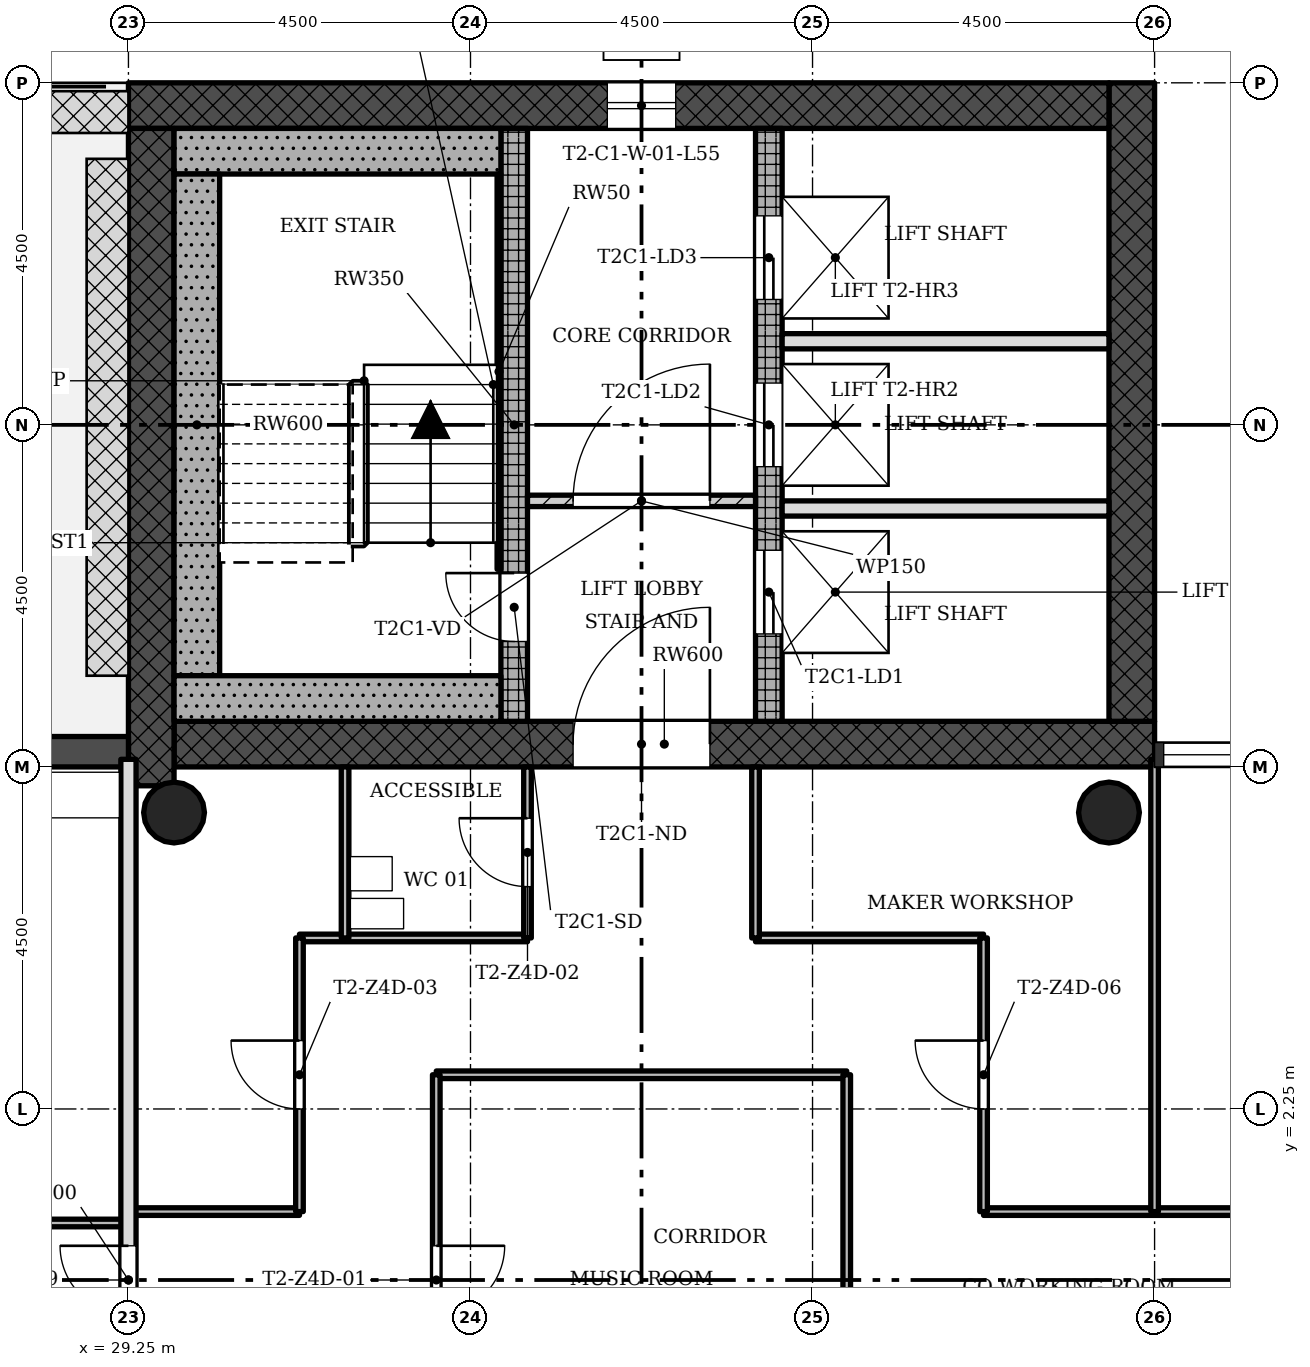
"""IFC4 building model, lengths in metres.
Left out: names, types, materials, properties, quantities, classifications, styles, units other than length and angle.
Written with IfcOpenShell. Run it as: python <this file> out.ifc"""

import sys

from ifc_helpers import new_model, si_unit, direction, frame, frame_2d, origin, origin_2d, place, context, subcontext, project, spatial, rectangle, hollow_circle, extrude, element, fill, save


model = new_model("IFC4")
c1 = context("Model", 3, precision=1e-05, world=origin(), true_north=direction((0.0, 1.0)))
c2 = subcontext(c1, "Body", "Model", "MODEL_VIEW")
j1 = project(units=[si_unit("LENGTHUNIT", "METRE"), si_unit("PLANEANGLEUNIT", "RADIAN")], contexts=[c1])
p1 = place(None, origin())
s1 = spatial("IfcSite", under=j1, at=p1, CompositionType="ELEMENT")
p2 = place(p1, origin())
s2 = spatial("IfcBuilding", under=s1, at=p2, CompositionType="ELEMENT")
p3 = place(p2, frame((0.0, 0.0, 199.4)))
s3 = spatial("IfcBuildingStorey", under=s2, at=p3, CompositionType="ELEMENT", Elevation=199.4)
p4 = place(p3, frame((29.85, 7.05, 0.0), z_axis=(0.0, 0.0, 1.0), x_axis=(1.0, 0.0, 0.0)))
e1 = element("IfcWall", 1, at=p4, inside=s3, PredefinedType="SHEAR", context=c2, shape_type="SweptSolid", body=[
    extrude(rectangle(XDim=12.9, YDim=0.6, at=frame_2d((6.45, 0.0))), origin(), (0.0, 0.0, 1.0), 3.4),
])
p5 = place(p4, frame((5.25, 0.0, 0.0)))
e2 = element("IfcOpeningElement", 2, at=p5, cuts=e1, PredefinedType="OPENING", context=c2, shape_type="SweptSolid", body=[
    extrude(rectangle(XDim=1.8, YDim=2.1, at=frame_2d((0.9, 1.05))), frame((0.0, 0.31, 0.0), z_axis=(0.0, -1.0, 0.0), x_axis=(1.0, 0.0, 0.0)), (0.0, 0.0, 1.0), 0.62),
])
p6 = place(p3, frame((42.45, 7.35, 0.0), z_axis=(0.0, 0.0, 1.0), x_axis=(0.0, 1.0, 0.0)))
e3 = element("IfcWall", 3, at=p6, inside=s3, PredefinedType="SHEAR", context=c2, shape_type="SweptSolid", body=[
    extrude(rectangle(XDim=8.4, YDim=0.6, at=frame_2d((4.2, 0.0))), origin(), (0.0, 0.0, 1.0), 3.4),
])
p7 = place(p3, frame((42.15, 15.45, 0.0), z_axis=(0.0, 0.0, 1.0), x_axis=(-1.0, 0.0, 0.0)))
e4 = element("IfcWall", 4, at=p7, inside=s3, PredefinedType="SHEAR", context=c2, shape_type="SweptSolid", body=[
    extrude(rectangle(XDim=12.9, YDim=0.6, at=frame_2d((6.45, 0.0))), origin(), (0.0, 0.0, 1.0), 3.4),
])
p8 = place(p7, frame((5.7, 0.0, 0.45)))
e5 = element("IfcOpeningElement", 5, at=p8, cuts=e4, PredefinedType="OPENING", context=c2, shape_type="SweptSolid", body=[
    extrude(rectangle(XDim=0.9, YDim=2.4, at=frame_2d((0.45, 1.2))), frame((0.0, 0.31, 0.0), z_axis=(0.0, -1.0, 0.0), x_axis=(1.0, 0.0, 0.0)), (0.0, 0.0, 1.0), 0.62),
])
p9 = place(p3, frame((29.55, 15.15, 0.0), z_axis=(0.0, 0.0, 1.0), x_axis=(0.0, -1.0, 0.0)))
e6 = element("IfcWall", 6, at=p9, inside=s3, PredefinedType="SHEAR", context=c2, shape_type="SweptSolid", body=[
    extrude(rectangle(XDim=8.648, YDim=0.6, at=frame_2d((4.324, 0.0))), origin(), (0.0, 0.0, 1.0), 3.4),
])
p10 = place(p3, frame((34.325, 7.35, 0.0), z_axis=(0.0, 0.0, 1.0), x_axis=(0.0, 1.0, 0.0)))
e7 = element("IfcWall", 7, at=p10, inside=s3, PredefinedType="SHEAR", context=c2, shape_type="SweptSolid", body=[
    extrude(rectangle(XDim=7.8, YDim=0.35, at=frame_2d((3.9, 0.0))), origin(), (0.0, 0.0, 1.0), 3.4),
])
p11 = place(p10, frame((1.05, 0.0, 0.0)))
e8 = element("IfcOpeningElement", 8, at=p11, cuts=e7, PredefinedType="OPENING", context=c2, shape_type="SweptSolid", body=[
    extrude(rectangle(XDim=0.9, YDim=2.1, at=frame_2d((0.45, 1.05))), frame((0.0, 0.185, 0.0), z_axis=(0.0, -1.0, 0.0), x_axis=(1.0, 0.0, 0.0)), (0.0, 0.0, 1.0), 0.37),
])
p12 = place(p3, frame((37.675, 7.35, 0.0), z_axis=(0.0, 0.0, 1.0), x_axis=(0.0, 1.0, 0.0)))
e9 = element("IfcWall", 9, at=p12, inside=s3, PredefinedType="SHEAR", context=c2, shape_type="SweptSolid", body=[
    extrude(rectangle(XDim=7.8, YDim=0.35, at=frame_2d((3.9, 0.0))), origin(), (0.0, 0.0, 1.0), 3.4),
])
p13 = place(p12, frame((1.15, 0.0, 0.0)))
e10 = element("IfcOpeningElement", 10, at=p13, cuts=e9, PredefinedType="OPENING", context=c2, shape_type="SweptSolid", body=[
    extrude(rectangle(XDim=1.1, YDim=2.1, at=frame_2d((0.55, 1.05))), frame((0.0, 0.185, 0.0), z_axis=(0.0, -1.0, 0.0), x_axis=(1.0, 0.0, 0.0)), (0.0, 0.0, 1.0), 0.37),
])
p14 = place(p12, frame((3.35, 0.0, 0.0)))
e11 = element("IfcOpeningElement", 11, at=p14, cuts=e9, PredefinedType="OPENING", context=c2, shape_type="SweptSolid", body=[
    extrude(rectangle(XDim=1.1, YDim=2.1, at=frame_2d((0.55, 1.05))), frame((0.0, 0.185, 0.0), z_axis=(0.0, -1.0, 0.0), x_axis=(1.0, 0.0, 0.0)), (0.0, 0.0, 1.0), 0.37),
])
p15 = place(p12, frame((5.55, 0.0, 0.0)))
e12 = element("IfcOpeningElement", 12, at=p15, cuts=e9, PredefinedType="OPENING", context=c2, shape_type="SweptSolid", body=[
    extrude(rectangle(XDim=1.1, YDim=2.1, at=frame_2d((0.55, 1.05))), frame((0.0, 0.185, 0.0), z_axis=(0.0, -1.0, 0.0), x_axis=(1.0, 0.0, 0.0)), (0.0, 0.0, 1.0), 0.37),
])
for number, where, z_axis, x_axis in (
    (13, (42.15, 6.15, 0.0), (0.0, 0.0, 1.0), (1.0, 0.0, 0.0)),
    (14, (29.85, 6.15, 0.0), (0.0, 0.0, 1.0), (1.0, 0.0, 0.0)),
):
    element("IfcColumn", number, at=place(p3, frame(where, z_axis=z_axis, x_axis=x_axis)), inside=s3, PredefinedType="COLUMN", context=c2, shape_type="SweptSolid", body=[
        extrude(hollow_circle(Radius=0.4, WallThickness=0.028, at=origin_2d()), origin(), (0.0, 0.0, 1.0), 3.4),
    ])
p16 = place(p3, frame((29.25, 6.95, -0.02), z_axis=(0.0, 0.0, 1.0), x_axis=(-1.0, 0.0, 0.0)))
e15 = element("IfcWall", 15, at=p16, inside=s3, PredefinedType="STANDARD", context=c2, shape_type="SweptSolid", body=[
    extrude(rectangle(XDim=4.5, YDim=0.4, at=frame_2d((2.25, 0.0))), origin(), (0.0, 0.0, 1.0), 3.12),
])
p17 = place(p16, frame((1.35, 0.0, 0.02)))
e16 = element("IfcOpeningElement", 16, at=p17, cuts=e15, PredefinedType="OPENING", context=c2, shape_type="SweptSolid", body=[
    extrude(rectangle(XDim=1.8, YDim=2.1, at=frame_2d((0.9, 1.05))), frame((0.0, 0.21, 0.0), z_axis=(0.0, -1.0, 0.0), x_axis=(1.0, 0.0, 0.0)), (0.0, 0.0, 1.0), 0.42),
])
p18 = place(p3, frame((37.5, 10.25, 0.0), z_axis=(0.0, 0.0, 1.0), x_axis=(-1.0, 0.0, 0.0)))
e17 = element("IfcWall", 17, at=p18, inside=s3, PredefinedType="PARTITIONING", context=c2, shape_type="SweptSolid", body=[
    extrude(rectangle(XDim=3.0, YDim=0.15, at=frame_2d((1.5, 0.0))), origin(), (0.0, 0.0, 1.0), 3.0),
])
p19 = place(p18, frame((0.6, 0.0, 0.0)))
e18 = element("IfcOpeningElement", 18, at=p19, cuts=e17, PredefinedType="OPENING", context=c2, shape_type="SweptSolid", body=[
    extrude(rectangle(XDim=1.8, YDim=2.1, at=frame_2d((0.9, 1.05))), frame((0.0, 0.085, 0.0), z_axis=(0.0, -1.0, 0.0), x_axis=(1.0, 0.0, 0.0)), (0.0, 0.0, 1.0), 0.17),
])
for number, where, z_axis, x_axis in (
    (19, (42.15, 10.15, 0.0), (0.0, 0.0, 1.0), (-1.0, 0.0, 0.0)),
    (20, (42.15, 12.35, 0.0), (0.0, 0.0, 1.0), (-1.0, 0.0, 0.0)),
):
    element("IfcWall", number, at=place(p3, frame(where, z_axis=z_axis, x_axis=x_axis)), inside=s3, PredefinedType="SOLIDWALL", context=c2, shape_type="SweptSolid", body=[
        extrude(rectangle(XDim=4.3, YDim=0.2, at=frame_2d((2.15, 0.0))), origin(), (0.0, 0.0, 1.0), 3.0),
    ])
p20 = place(p3, frame((29.25, 0.75, 0.0), z_axis=(0.0, 0.0, 1.0), x_axis=(-1.0, 0.0, 0.0)))
e21 = element("IfcWall", 21, at=p20, inside=s3, PredefinedType="PARTITIONING", context=c2, shape_type="SweptSolid", body=[
    extrude(rectangle(XDim=7.8, YDim=0.1, at=frame_2d((3.9, 0.0))), origin(), (0.0, 0.0, 1.0), 3.0),
])
p21 = place(p20, frame((1.8, 0.0, 0.0)))
e22 = element("IfcOpeningElement", 22, at=p21, cuts=e21, PredefinedType="OPENING", context=c2, shape_type="SweptSolid", body=[
    extrude(rectangle(XDim=0.9, YDim=2.1, at=frame_2d((0.45, 1.05))), frame((0.0, 0.06, 0.0), z_axis=(0.0, -1.0, 0.0), x_axis=(1.0, 0.0, 0.0)), (0.0, 0.0, 1.0), 0.12),
])
p22 = place(p20, frame((4.95, 0.0, 0.0)))
e23 = element("IfcOpeningElement", 23, at=p22, cuts=e21, PredefinedType="OPENING", context=c2, shape_type="SweptSolid", body=[
    extrude(rectangle(XDim=0.9, YDim=2.1, at=frame_2d((0.45, 1.05))), frame((0.0, 0.06, 0.0), z_axis=(0.0, -1.0, 0.0), x_axis=(1.0, 0.0, 0.0)), (0.0, 0.0, 1.0), 0.12),
])
p23 = place(p20, frame((6.6, 0.0, 0.0)))
e24 = element("IfcOpeningElement", 24, at=p23, cuts=e21, PredefinedType="OPENING", context=c2, shape_type="SweptSolid", body=[
    extrude(rectangle(XDim=0.9, YDim=2.1, at=frame_2d((0.45, 1.05))), frame((0.0, 0.06, 0.0), z_axis=(0.0, -1.0, 0.0), x_axis=(1.0, 0.0, 0.0)), (0.0, 0.0, 1.0), 0.12),
])
p24 = place(p3, frame((44.55, 0.9, 0.0), z_axis=(0.0, 0.0, 1.0), x_axis=(-1.0, 0.0, 0.0)))
e25 = element("IfcWall", 25, at=p24, inside=s3, PredefinedType="PARTITIONING", context=c2, shape_type="SweptSolid", body=[
    extrude(rectangle(XDim=4.05, YDim=0.1, at=frame_2d((2.025, 0.0))), origin(), (0.0, 0.0, 1.0), 3.0),
])
p25 = place(p3, frame((31.5, 0.9, 0.0), z_axis=(0.0, 0.0, 1.0), x_axis=(-1.0, 0.0, 0.0)))
e26 = element("IfcWall", 26, at=p25, inside=s3, PredefinedType="PARTITIONING", context=c2, shape_type="SweptSolid", body=[
    extrude(rectangle(XDim=2.25, YDim=0.1, at=frame_2d((1.125, 0.0))), origin(), (0.0, 0.0, 1.0), 3.0),
])
p26 = place(p3, frame((38.7, 2.7, 0.0), z_axis=(0.0, 0.0, 1.0), x_axis=(-1.0, 0.0, 0.0)))
e27 = element("IfcWall", 27, at=p26, inside=s3, PredefinedType="PARTITIONING", context=c2, shape_type="SweptSolid", body=[
    extrude(rectangle(XDim=5.4, YDim=0.1, at=frame_2d((2.7, 0.0))), origin(), (0.0, 0.0, 1.0), 3.0),
])
for number, where, z_axis, x_axis in (
    (28, (40.5, 4.5, 0.0), (0.0, 0.0, 1.0), (-1.0, 0.0, 0.0)),
    (29, (34.5, 4.5, 0.0), (0.0, 0.0, 1.0), (-1.0, 0.0, 0.0)),
):
    element("IfcWall", number, at=place(p3, frame(where, z_axis=z_axis, x_axis=x_axis)), inside=s3, PredefinedType="PARTITIONING", context=c2, shape_type="SweptSolid", body=[
        extrude(rectangle(XDim=3.0, YDim=0.1, at=frame_2d((1.5, 0.0))), origin(), (0.0, 0.0, 1.0), 3.0),
    ])
p27 = place(p3, frame((42.75, 0.9, 0.0), z_axis=(0.0, 0.0, 1.0), x_axis=(0.0, 1.0, 0.0)))
e30 = element("IfcWall", 30, at=p27, inside=s3, PredefinedType="PARTITIONING", context=c2, shape_type="SweptSolid", body=[
    extrude(rectangle(XDim=5.95, YDim=0.1, at=frame_2d((2.975, 0.0))), origin(), (0.0, 0.0, 1.0), 3.0),
])
p28 = place(p3, frame((40.5, 0.9, 0.0), z_axis=(0.0, 0.0, 1.0), x_axis=(0.0, 1.0, 0.0)))
e31 = element("IfcWall", 31, at=p28, inside=s3, PredefinedType="PARTITIONING", context=c2, shape_type="SweptSolid", body=[
    extrude(rectangle(XDim=3.6, YDim=0.1, at=frame_2d((1.8, 0.0))), origin(), (0.0, 0.0, 1.0), 3.0),
])
p29 = place(p28, frame((1.35, 0.0, 0.0)))
e32 = element("IfcOpeningElement", 32, at=p29, cuts=e31, PredefinedType="OPENING", context=c2, shape_type="SweptSolid", body=[
    extrude(rectangle(XDim=0.9, YDim=2.1, at=frame_2d((0.45, 1.05))), frame((0.0, 0.06, 0.0), z_axis=(0.0, -1.0, 0.0), x_axis=(1.0, 0.0, 0.0)), (0.0, 0.0, 1.0), 0.12),
])
p30 = place(p3, frame((38.7, -2.7, 0.0), z_axis=(0.0, 0.0, 1.0), x_axis=(0.0, 1.0, 0.0)))
e33 = element("IfcWall", 33, at=p30, inside=s3, PredefinedType="PARTITIONING", context=c2, shape_type="SweptSolid", body=[
    extrude(rectangle(XDim=5.4, YDim=0.1, at=frame_2d((2.7, 0.0))), origin(), (0.0, 0.0, 1.0), 3.0),
])
p31 = place(p3, frame((37.5, 4.5, 0.0), z_axis=(0.0, 0.0, 1.0), x_axis=(0.0, 1.0, 0.0)))
e34 = element("IfcWall", 34, at=p31, inside=s3, PredefinedType="PARTITIONING", context=c2, shape_type="SweptSolid", body=[
    extrude(rectangle(XDim=2.25, YDim=0.1, at=frame_2d((1.125, 0.0))), origin(), (0.0, 0.0, 1.0), 3.0),
])
p32 = place(p3, frame((34.5, 4.5, 0.0), z_axis=(0.0, 0.0, 1.0), x_axis=(0.0, 1.0, 0.0)))
e35 = element("IfcWall", 35, at=p32, inside=s3, PredefinedType="PARTITIONING", context=c2, shape_type="SweptSolid", body=[
    extrude(rectangle(XDim=2.25, YDim=0.1, at=frame_2d((1.125, 0.0))), origin(), (0.0, 0.0, 1.0), 3.0),
])
p33 = place(p32, frame((0.675, 0.0, 0.0)))
e36 = element("IfcOpeningElement", 36, at=p33, cuts=e35, PredefinedType="OPENING", context=c2, shape_type="SweptSolid", body=[
    extrude(rectangle(XDim=0.9, YDim=2.1, at=frame_2d((0.45, 1.05))), frame((0.0, 0.06, 0.0), z_axis=(0.0, -1.0, 0.0), x_axis=(1.0, 0.0, 0.0)), (0.0, 0.0, 1.0), 0.12),
])
p34 = place(p3, frame((33.3, -2.7, 0.0), z_axis=(0.0, 0.0, 1.0), x_axis=(0.0, 1.0, 0.0)))
e37 = element("IfcWall", 37, at=p34, inside=s3, PredefinedType="PARTITIONING", context=c2, shape_type="SweptSolid", body=[
    extrude(rectangle(XDim=5.4, YDim=0.1, at=frame_2d((2.7, 0.0))), origin(), (0.0, 0.0, 1.0), 3.0),
])
p35 = place(p34, frame((2.25, 0.0, 0.0)))
e38 = element("IfcOpeningElement", 38, at=p35, cuts=e37, PredefinedType="OPENING", context=c2, shape_type="SweptSolid", body=[
    extrude(rectangle(XDim=0.9, YDim=2.1, at=frame_2d((0.45, 1.05))), frame((0.0, 0.06, 0.0), z_axis=(0.0, -1.0, 0.0), x_axis=(1.0, 0.0, 0.0)), (0.0, 0.0, 1.0), 0.12),
])
p36 = place(p3, frame((32.1, 4.5, 0.0), z_axis=(0.0, 0.0, 1.0), x_axis=(0.0, 1.0, 0.0)))
e39 = element("IfcWall", 39, at=p36, inside=s3, PredefinedType="PARTITIONING", context=c2, shape_type="SweptSolid", body=[
    extrude(rectangle(XDim=2.25, YDim=0.1, at=frame_2d((1.125, 0.0))), origin(), (0.0, 0.0, 1.0), 3.0),
])
p37 = place(p3, frame((31.5, 0.9, 0.0), z_axis=(0.0, 0.0, 1.0), x_axis=(0.0, 1.0, 0.0)))
e40 = element("IfcWall", 40, at=p37, inside=s3, PredefinedType="PARTITIONING", context=c2, shape_type="SweptSolid", body=[
    extrude(rectangle(XDim=3.6, YDim=0.1, at=frame_2d((1.8, 0.0))), origin(), (0.0, 0.0, 1.0), 3.0),
])
p38 = place(p37, frame((1.35, 0.0, 0.0)))
e41 = element("IfcOpeningElement", 41, at=p38, cuts=e40, PredefinedType="OPENING", context=c2, shape_type="SweptSolid", body=[
    extrude(rectangle(XDim=0.9, YDim=2.1, at=frame_2d((0.45, 1.05))), frame((0.0, 0.06, 0.0), z_axis=(0.0, -1.0, 0.0), x_axis=(1.0, 0.0, 0.0)), (0.0, 0.0, 1.0), 0.12),
])
p39 = place(p3, frame((29.25, -6.85, 0.0), z_axis=(0.0, 0.0, 1.0), x_axis=(0.0, 1.0, 0.0)))
e42 = element("IfcWall", 42, at=p39, inside=s3, PredefinedType="SOLIDWALL", context=c2, shape_type="SweptSolid", body=[
    extrude(rectangle(XDim=13.7, YDim=0.2, at=frame_2d((6.85, 0.0))), origin(), (0.0, 0.0, 1.0), 3.0),
])
p40 = place(p39, frame((6.4, 0.0, 0.0)))
e43 = element("IfcOpeningElement", 43, at=p40, cuts=e42, PredefinedType="OPENING", context=c2, shape_type="SweptSolid", body=[
    extrude(rectangle(XDim=0.9, YDim=2.1, at=frame_2d((0.45, 1.05))), frame((0.0, 0.11, 0.0), z_axis=(0.0, -1.0, 0.0), x_axis=(1.0, 0.0, 0.0)), (0.0, 0.0, 1.0), 0.22),
])
p41 = place(p3, frame((34.15, 14.85, 0.0), z_axis=(0.0, 0.0, 1.0), x_axis=(-1.0, 0.0, 0.0)))
e44 = element("IfcWall", 44, at=p41, inside=s3, PredefinedType="SHEAR", context=c2, shape_type="SweptSolid", body=[
    extrude(rectangle(XDim=4.3, YDim=0.6, at=frame_2d((2.15, 0.0))), origin(), (0.0, 0.0, 1.0), 3.4),
])
p42 = place(p3, frame((30.15, 7.95, 0.0), z_axis=(0.0, 0.0, 1.0), x_axis=(0.0, 1.0, 0.0)))
e45 = element("IfcWall", 45, at=p42, inside=s3, PredefinedType="SHEAR", context=c2, shape_type="SweptSolid", body=[
    extrude(rectangle(XDim=6.6, YDim=0.6, at=frame_2d((3.3, 0.0))), origin(), (0.0, 0.0, 1.0), 3.4),
])
p43 = place(p3, frame((34.15, 7.65, 0.0), z_axis=(0.0, 0.0, 1.0), x_axis=(-1.0, 0.0, 0.0)))
e46 = element("IfcWall", 46, at=p43, inside=s3, PredefinedType="SHEAR", context=c2, shape_type="SweptSolid", body=[
    extrude(rectangle(XDim=4.3, YDim=0.6, at=frame_2d((2.15, 0.0))), origin(), (0.0, 0.0, 1.0), 3.4),
])
p44 = place(p3, frame((34.125, 9.35, 0.0), z_axis=(0.0, 0.0, 1.0), x_axis=(0.0, 1.0, 0.0)))
e47 = element("IfcWall", 47, at=p44, inside=s3, PredefinedType="SHEAR", context=c2, shape_type="SweptSolid", body=[
    extrude(rectangle(XDim=5.2, YDim=0.05, at=frame_2d((2.6, 0.0))), origin(), (0.0, 0.0, 1.0), 3.4),
])
p45 = place(p8, origin())
e48 = element("IfcWindow", 48, at=p45, inside=s3, PartitioningType="SINGLE_PANEL", PredefinedType="WINDOW", context=c2, shape_type="SweptSolid", body=[
    extrude(rectangle(XDim=0.9, YDim=2.4, at=frame_2d((0.45, 1.2))), frame((0.0, 0.03, 0.0), z_axis=(0.0, -1.0, 0.0), x_axis=(1.0, 0.0, 0.0)), (0.0, 0.0, 1.0), 0.06),
])
fill(e5, e48)
p46 = place(p19, origin())
e49 = element("IfcDoor", 49, at=p46, inside=s3, OperationType="SINGLE_SWING_LEFT", PredefinedType="DOOR", context=c2, shape_type="SweptSolid", body=[
    extrude(rectangle(XDim=1.8, YDim=2.1, at=frame_2d((0.9, 1.05))), frame((0.0, 0.025, 0.0), z_axis=(0.0, -1.0, 0.0), x_axis=(1.0, 0.0, 0.0)), (0.0, 0.0, 1.0), 0.05),
])
fill(e18, e49)
p47 = place(p35, origin())
e50 = element("IfcDoor", 50, at=p47, inside=s3, OperationType="SINGLE_SWING_RIGHT", PredefinedType="DOOR", context=c2, shape_type="SweptSolid", body=[
    extrude(rectangle(XDim=0.9, YDim=2.1, at=frame_2d((0.45, 1.05))), frame((0.0, 0.025, 0.0), z_axis=(0.0, -1.0, 0.0), x_axis=(1.0, 0.0, 0.0)), (0.0, 0.0, 1.0), 0.05),
])
fill(e38, e50)
p48 = place(p33, origin())
e51 = element("IfcDoor", 51, at=p48, inside=s3, OperationType="SINGLE_SWING_LEFT", PredefinedType="DOOR", context=c2, shape_type="SweptSolid", body=[
    extrude(rectangle(XDim=0.9, YDim=2.1, at=frame_2d((0.45, 1.05))), frame((0.0, 0.025, 0.0), z_axis=(0.0, -1.0, 0.0), x_axis=(1.0, 0.0, 0.0)), (0.0, 0.0, 1.0), 0.05),
])
fill(e36, e51)
p49 = place(p38, origin())
e52 = element("IfcDoor", 52, at=p49, inside=s3, OperationType="SINGLE_SWING_LEFT", PredefinedType="DOOR", context=c2, shape_type="SweptSolid", body=[
    extrude(rectangle(XDim=0.9, YDim=2.1, at=frame_2d((0.45, 1.05))), frame((0.0, 0.025, 0.0), z_axis=(0.0, -1.0, 0.0), x_axis=(1.0, 0.0, 0.0)), (0.0, 0.0, 1.0), 0.05),
])
fill(e41, e52)
p50 = place(p29, origin())
e53 = element("IfcDoor", 53, at=p50, inside=s3, OperationType="SINGLE_SWING_LEFT", PredefinedType="DOOR", context=c2, shape_type="SweptSolid", body=[
    extrude(rectangle(XDim=0.9, YDim=2.1, at=frame_2d((0.45, 1.05))), frame((0.0, 0.025, 0.0), z_axis=(0.0, -1.0, 0.0), x_axis=(1.0, 0.0, 0.0)), (0.0, 0.0, 1.0), 0.05),
])
fill(e32, e53)
p51 = place(p40, origin())
e54 = element("IfcDoor", 54, at=p51, inside=s3, OperationType="SINGLE_SWING_LEFT", PredefinedType="DOOR", context=c2, shape_type="SweptSolid", body=[
    extrude(rectangle(XDim=0.9, YDim=2.1, at=frame_2d((0.45, 1.05))), frame((0.0, 0.025, 0.0), z_axis=(0.0, -1.0, 0.0), x_axis=(1.0, 0.0, 0.0)), (0.0, 0.0, 1.0), 0.05),
])
fill(e43, e54)
p52 = place(p11, origin())
e55 = element("IfcDoor", 55, at=p52, inside=s3, OperationType="SINGLE_SWING_LEFT", PredefinedType="DOOR", context=c2, shape_type="SweptSolid", body=[
    extrude(rectangle(XDim=0.9, YDim=2.1, at=frame_2d((0.45, 1.05))), frame((0.0, 0.025, 0.0), z_axis=(0.0, -1.0, 0.0), x_axis=(1.0, 0.0, 0.0)), (0.0, 0.0, 1.0), 0.05),
])
fill(e8, e55)
p53 = place(p13, origin())
e56 = element("IfcDoor", 56, at=p53, inside=s3, OperationType="SLIDING_TO_LEFT", PredefinedType="DOOR", context=c2, shape_type="SweptSolid", body=[
    extrude(rectangle(XDim=1.1, YDim=2.1, at=frame_2d((0.55, 1.05))), frame((0.0, 0.025, 0.0), z_axis=(0.0, -1.0, 0.0), x_axis=(1.0, 0.0, 0.0)), (0.0, 0.0, 1.0), 0.05),
])
fill(e10, e56)
p54 = place(p14, origin())
e57 = element("IfcDoor", 57, at=p54, inside=s3, OperationType="SLIDING_TO_LEFT", PredefinedType="DOOR", context=c2, shape_type="SweptSolid", body=[
    extrude(rectangle(XDim=1.1, YDim=2.1, at=frame_2d((0.55, 1.05))), frame((0.0, 0.025, 0.0), z_axis=(0.0, -1.0, 0.0), x_axis=(1.0, 0.0, 0.0)), (0.0, 0.0, 1.0), 0.05),
])
fill(e11, e57)
p55 = place(p15, origin())
e58 = element("IfcDoor", 58, at=p55, inside=s3, OperationType="SLIDING_TO_LEFT", PredefinedType="DOOR", context=c2, shape_type="SweptSolid", body=[
    extrude(rectangle(XDim=1.1, YDim=2.1, at=frame_2d((0.55, 1.05))), frame((0.0, 0.025, 0.0), z_axis=(0.0, -1.0, 0.0), x_axis=(1.0, 0.0, 0.0)), (0.0, 0.0, 1.0), 0.05),
])
fill(e12, e58)
p56 = place(p5, origin())
e59 = element("IfcDoor", 59, at=p56, inside=s3, OperationType="SINGLE_SWING_LEFT", PredefinedType="DOOR", context=c2, shape_type="SweptSolid", body=[
    extrude(rectangle(XDim=1.8, YDim=2.1, at=frame_2d((0.9, 1.05))), frame((0.0, 0.025, 0.0), z_axis=(0.0, -1.0, 0.0), x_axis=(1.0, 0.0, 0.0)), (0.0, 0.0, 1.0), 0.05),
])
fill(e2, e59)
save(model, sys.argv[1])
